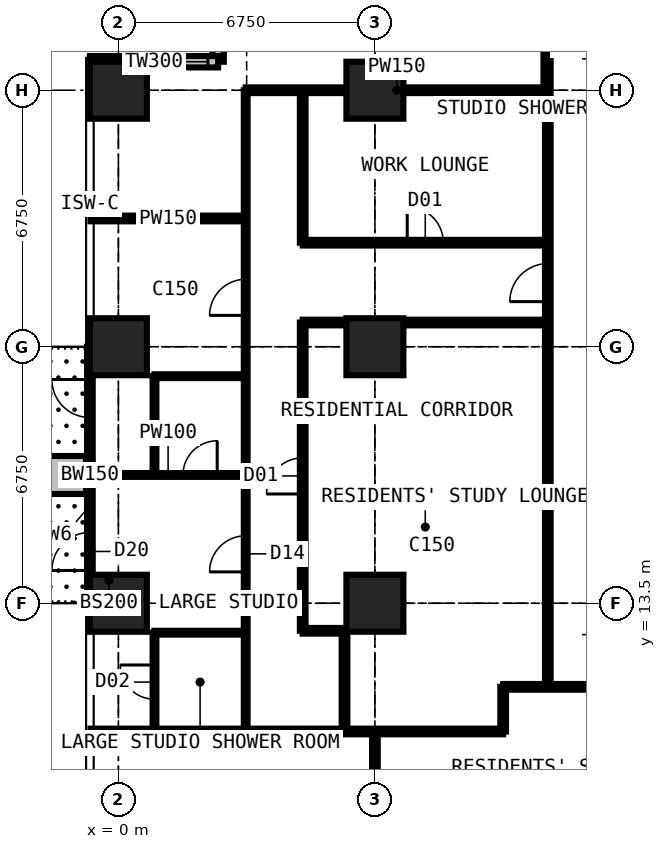
"""IFC4 building model, lengths in metres.
Left out: names, types, materials, properties, quantities, classifications, styles, units other than length and angle.
Written with IfcOpenShell. Run it as: python <this file> out.ifc"""

import sys

from ifc_helpers import new_model, si_unit, direction, frame, frame_2d, origin, origin_2d, place, context, subcontext, project, spatial, rectangle, extrude, element, fill, save


model = new_model("IFC4")
c1 = context("Model", 3, precision=1e-05, world=origin(), true_north=direction((0.0, 1.0)))
c2 = subcontext(c1, "Body", "Model", "MODEL_VIEW")
j1 = project(units=[si_unit("LENGTHUNIT", "METRE"), si_unit("PLANEANGLEUNIT", "RADIAN")], contexts=[c1])
p1 = place(None, origin())
s1 = spatial("IfcSite", under=j1, at=p1, CompositionType="ELEMENT")
p2 = place(p1, origin())
s2 = spatial("IfcBuilding", under=s1, at=p2, CompositionType="ELEMENT")
p3 = place(p2, frame((0.0, 0.0, 163.8)))
s3 = spatial("IfcBuildingStorey", under=s2, at=p3, CompositionType="ELEMENT", Elevation=163.8)
for number, where, z_axis, x_axis in (
    (1, (0.0, 13.5, 0.0), (0.0, 0.0, 1.0), (1.0, 0.0, 0.0)),
    (2, (0.0, 20.25, 0.0), (0.0, 0.0, 1.0), (1.0, 0.0, 0.0)),
    (3, (0.0, 27.0, 0.0), (0.0, 0.0, 1.0), (1.0, 0.0, 0.0)),
    (4, (6.75, 13.5, 0.0), (0.0, 0.0, 1.0), (1.0, 0.0, 0.0)),
    (5, (6.75, 20.25, 0.0), (0.0, 0.0, 1.0), (1.0, 0.0, 0.0)),
    (6, (6.75, 27.0, 0.0), (0.0, 0.0, 1.0), (1.0, 0.0, 0.0)),
):
    element("IfcColumn", number, at=place(p3, frame(where, z_axis=z_axis, x_axis=x_axis)), inside=s3, PredefinedType="COLUMN", context=c2, shape_type="SweptSolid", body=[
        extrude(rectangle(XDim=1.5, YDim=1.5, at=origin_2d()), origin(), (0.0, 0.0, 1.0), 3.6),
    ])
p4 = place(p3, frame((2.625, 31.125, 0.0), z_axis=(0.0, 0.0, 1.0), x_axis=(0.0, -1.0, 0.0)))
e7 = element("IfcWall", 7, at=p4, inside=s3, PredefinedType="SOLIDWALL", context=c2, shape_type="SweptSolid", body=[
    extrude(rectangle(XDim=3.375, YDim=0.3, at=frame_2d((1.688, 0.0))), origin(), (0.0, 0.0, 1.0), 3.375),
])
p5 = place(p4, frame((0.788, 0.0, 0.6)))
e8 = element("IfcOpeningElement", 8, at=p5, cuts=e7, PredefinedType="OPENING", context=c2, shape_type="SweptSolid", body=[
    extrude(rectangle(XDim=1.8, YDim=2.1, at=frame_2d((0.9, 1.05))), frame((0.0, 0.16, 0.0), z_axis=(0.0, -1.0, 0.0), x_axis=(1.0, 0.0, 0.0)), (0.0, 0.0, 1.0), 0.32),
])
p6 = place(p3, frame((2.625, 27.75, 0.0), z_axis=(0.0, 0.0, 1.0), x_axis=(-1.0, 0.0, 0.0)))
e9 = element("IfcWall", 9, at=p6, inside=s3, PredefinedType="SOLIDWALL", context=c2, shape_type="SweptSolid", body=[
    extrude(rectangle(XDim=3.375, YDim=0.3, at=frame_2d((1.688, 0.0))), origin(), (0.0, 0.0, 1.0), 3.375),
])
p7 = place(p6, frame((0.268, 0.0, 0.9)))
e10 = element("IfcOpeningElement", 10, at=p7, cuts=e9, PredefinedType="OPENING", context=c2, shape_type="SweptSolid", body=[
    extrude(rectangle(XDim=1.5, YDim=1.8, at=frame_2d((0.75, 0.9))), frame((0.0, 0.16, 0.0), z_axis=(0.0, -1.0, 0.0), x_axis=(1.0, 0.0, 0.0)), (0.0, 0.0, 1.0), 0.32),
])
p8 = place(p3, frame((-0.75, 13.5, 0.0), z_axis=(0.0, 0.0, 1.0), x_axis=(0.0, 1.0, 0.0)))
e11 = element("IfcWall", 11, at=p8, inside=s3, PredefinedType="SOLIDWALL", context=c2, shape_type="SweptSolid", body=[
    extrude(rectangle(XDim=6.75, YDim=0.15, at=frame_2d((3.375, 0.0))), origin(), (0.0, 0.0, 1.0), 3.375),
])
p9 = place(p8, frame((0.863, 0.0, 0.0)))
e12 = element("IfcOpeningElement", 12, at=p9, cuts=e11, PredefinedType="OPENING", context=c2, shape_type="SweptSolid", body=[
    extrude(rectangle(XDim=1.0, YDim=2.2, at=frame_2d((0.5, 1.1))), frame((0.0, 0.085, 0.0), z_axis=(0.0, -1.0, 0.0), x_axis=(1.0, 0.0, 0.0)), (0.0, 0.0, 1.0), 0.17),
])
p10 = place(p8, frame((1.975, 0.0, 0.9)))
e13 = element("IfcOpeningElement", 13, at=p10, cuts=e11, PredefinedType="OPENING", context=c2, shape_type="SweptSolid", body=[
    extrude(rectangle(XDim=1.2, YDim=1.8, at=frame_2d((0.6, 0.9))), frame((0.0, 0.085, 0.0), z_axis=(0.0, -1.0, 0.0), x_axis=(1.0, 0.0, 0.0)), (0.0, 0.0, 1.0), 0.17),
])
p11 = place(p8, frame((4.887, 0.0, 0.0)))
e14 = element("IfcOpeningElement", 14, at=p11, cuts=e11, PredefinedType="OPENING", context=c2, shape_type="SweptSolid", body=[
    extrude(rectangle(XDim=1.0, YDim=2.2, at=frame_2d((0.5, 1.1))), frame((0.0, 0.085, 0.0), z_axis=(0.0, -1.0, 0.0), x_axis=(1.0, 0.0, 0.0)), (0.0, 0.0, 1.0), 0.17),
])
p12 = place(p8, frame((3.575, 0.0, 0.9)))
e15 = element("IfcOpeningElement", 15, at=p12, cuts=e11, PredefinedType="OPENING", context=c2, shape_type="SweptSolid", body=[
    extrude(rectangle(XDim=1.2, YDim=1.8, at=frame_2d((0.6, 0.9))), frame((0.0, 0.085, 0.0), z_axis=(0.0, -1.0, 0.0), x_axis=(1.0, 0.0, 0.0)), (0.0, 0.0, 1.0), 0.17),
])
p13 = place(p3, frame((-0.85, 16.875, 0.0), z_axis=(0.0, 0.0, 1.0), x_axis=(-1.0, 0.0, 0.0)))
e16 = element("IfcWall", 16, at=p13, inside=s3, PredefinedType="USERDEFINED", context=c2, shape_type="SweptSolid", body=[
    extrude(rectangle(XDim=2.2, YDim=1.0, at=frame_2d((1.1, 0.0))), origin(), (0.0, 0.0, 1.0), 0.9),
])
p14 = place(p3, frame((-0.734, 10.125, 0.0), z_axis=(0.0, 0.0, 1.0), x_axis=(1.0, 0.0, 0.0)))
e17 = element("IfcWall", 17, at=p14, inside=s3, PredefinedType="PARTITIONING", context=c2, shape_type="SweptSolid", body=[
    extrude(rectangle(XDim=10.859, YDim=0.15, at=frame_2d((5.429, 0.0))), origin(), (0.0, 0.0, 1.0), 3.375),
])
p15 = place(p3, frame((-0.734, 16.875, 0.0), z_axis=(0.0, 0.0, 1.0), x_axis=(1.0, 0.0, 0.0)))
e18 = element("IfcWall", 18, at=p15, inside=s3, PredefinedType="PARTITIONING", context=c2, shape_type="SweptSolid", body=[
    extrude(rectangle(XDim=4.084, YDim=0.1, at=frame_2d((2.042, 0.0))), origin(), (0.0, 0.0, 1.0), 3.375),
])
p16 = place(p15, frame((2.434, 0.0, 0.0)))
e19 = element("IfcOpeningElement", 19, at=p16, cuts=e18, PredefinedType="OPENING", context=c2, shape_type="SweptSolid", body=[
    extrude(rectangle(XDim=0.9, YDim=2.2, at=frame_2d((0.45, 1.1))), frame((0.0, 0.06, 0.0), z_axis=(0.0, -1.0, 0.0), x_axis=(1.0, 0.0, 0.0)), (0.0, 0.0, 1.0), 0.12),
])
p17 = place(p3, frame((-0.734, 23.625, 0.0), z_axis=(0.0, 0.0, 1.0), x_axis=(1.0, 0.0, 0.0)))
e20 = element("IfcWall", 20, at=p17, inside=s3, PredefinedType="PARTITIONING", context=c2, shape_type="SweptSolid", body=[
    extrude(rectangle(XDim=4.084, YDim=0.15, at=frame_2d((2.042, 0.0))), origin(), (0.0, 0.0, 1.0), 3.375),
])
p18 = place(p3, frame((0.95, 10.125, 0.0), z_axis=(0.0, 0.0, 1.0), x_axis=(0.0, 1.0, 0.0)))
e21 = element("IfcWall", 21, at=p18, inside=s3, PredefinedType="PARTITIONING", context=c2, shape_type="SweptSolid", body=[
    extrude(rectangle(XDim=2.6, YDim=0.1, at=frame_2d((1.3, 0.0))), origin(), (0.0, 0.0, 1.0), 3.375),
])
p19 = place(p18, frame((0.85, 0.0, 0.0)))
e22 = element("IfcOpeningElement", 22, at=p19, cuts=e21, PredefinedType="OPENING", context=c2, shape_type="SweptSolid", body=[
    extrude(rectangle(XDim=0.9, YDim=2.2, at=frame_2d((0.45, 1.1))), frame((0.0, 0.06, 0.0), z_axis=(0.0, -1.0, 0.0), x_axis=(1.0, 0.0, 0.0)), (0.0, 0.0, 1.0), 0.12),
])
p20 = place(p3, frame((0.95, 12.725, 0.0), z_axis=(0.0, 0.0, 1.0), x_axis=(1.0, 0.0, 0.0)))
e23 = element("IfcWall", 23, at=p20, inside=s3, PredefinedType="PARTITIONING", context=c2, shape_type="SweptSolid", body=[
    extrude(rectangle(XDim=2.4, YDim=0.1, at=frame_2d((1.2, 0.0))), origin(), (0.0, 0.0, 1.0), 3.375),
])
p21 = place(p3, frame((0.95, 16.875, 0.0), z_axis=(0.0, 0.0, 1.0), x_axis=(0.0, 1.0, 0.0)))
e24 = element("IfcWall", 24, at=p21, inside=s3, PredefinedType="PARTITIONING", context=c2, shape_type="SweptSolid", body=[
    extrude(rectangle(XDim=2.6, YDim=0.1, at=frame_2d((1.3, 0.0))), origin(), (0.0, 0.0, 1.0), 3.375),
])
p22 = place(p3, frame((0.95, 19.475, 0.0), z_axis=(0.0, 0.0, 1.0), x_axis=(1.0, 0.0, 0.0)))
e25 = element("IfcWall", 25, at=p22, inside=s3, PredefinedType="PARTITIONING", context=c2, shape_type="SweptSolid", body=[
    extrude(rectangle(XDim=2.4, YDim=0.1, at=frame_2d((1.2, 0.0))), origin(), (0.0, 0.0, 1.0), 3.375),
])
p23 = place(p3, frame((3.35, 10.125, 0.0), z_axis=(0.0, 0.0, 1.0), x_axis=(0.0, 1.0, 0.0)))
e26 = element("IfcWall", 26, at=p23, inside=s3, PredefinedType="PARTITIONING", context=c2, shape_type="SweptSolid", body=[
    extrude(rectangle(XDim=16.875, YDim=0.1, at=frame_2d((8.438, 0.0))), origin(), (0.0, 0.0, 1.0), 3.375),
])
p24 = place(p23, frame((4.2, 0.0, 0.0)))
e27 = element("IfcOpeningElement", 27, at=p24, cuts=e26, PredefinedType="OPENING", context=c2, shape_type="SweptSolid", body=[
    extrude(rectangle(XDim=0.95, YDim=2.2, at=frame_2d((0.475, 1.1))), frame((0.0, 0.06, 0.0), z_axis=(0.0, -1.0, 0.0), x_axis=(1.0, 0.0, 0.0)), (0.0, 0.0, 1.0), 0.12),
])
p25 = place(p23, frame((10.95, 0.0, 0.0)))
e28 = element("IfcOpeningElement", 28, at=p25, cuts=e26, PredefinedType="OPENING", context=c2, shape_type="SweptSolid", body=[
    extrude(rectangle(XDim=0.95, YDim=2.2, at=frame_2d((0.475, 1.1))), frame((0.0, 0.06, 0.0), z_axis=(0.0, -1.0, 0.0), x_axis=(1.0, 0.0, 0.0)), (0.0, 0.0, 1.0), 0.12),
])
p26 = place(p3, frame((3.35, 27.0, 0.0), z_axis=(0.0, 0.0, 1.0), x_axis=(1.0, 0.0, 0.0)))
e29 = element("IfcWall", 29, at=p26, inside=s3, PredefinedType="PARTITIONING", context=c2, shape_type="SweptSolid", body=[
    extrude(rectangle(XDim=7.95, YDim=0.15, at=frame_2d((3.975, 0.0))), origin(), (0.0, 0.0, 1.0), 2.806),
])
p27 = place(p3, frame((4.85, 12.775, 0.0), z_axis=(0.0, 0.0, 1.0), x_axis=(0.0, 1.0, 0.0)))
e30 = element("IfcWall", 30, at=p27, inside=s3, PredefinedType="PARTITIONING", context=c2, shape_type="SweptSolid", body=[
    extrude(rectangle(XDim=8.113, YDim=0.15, at=frame_2d((4.056, 0.0))), origin(), (0.0, 0.0, 1.0), 3.375),
])
p28 = place(p27, frame((3.6, 0.0, 0.0)))
e31 = element("IfcOpeningElement", 31, at=p28, cuts=e30, PredefinedType="OPENING", context=c2, shape_type="SweptSolid", body=[
    extrude(rectangle(XDim=0.95, YDim=2.2, at=frame_2d((0.475, 1.1))), frame((0.0, 0.085, 0.0), z_axis=(0.0, -1.0, 0.0), x_axis=(1.0, 0.0, 0.0)), (0.0, 0.0, 1.0), 0.17),
])
p29 = place(p3, frame((4.85, 12.775, 0.0), z_axis=(0.0, 0.0, 1.0), x_axis=(1.0, 0.0, 0.0)))
e32 = element("IfcWall", 32, at=p29, inside=s3, PredefinedType="PARTITIONING", context=c2, shape_type="SweptSolid", body=[
    extrude(rectangle(XDim=1.1, YDim=0.15, at=frame_2d((0.55, 0.0))), origin(), (0.0, 0.0, 1.0), 3.375),
])
p30 = place(p3, frame((4.85, 20.887, 0.0), z_axis=(0.0, 0.0, 1.0), x_axis=(1.0, 0.0, 0.0)))
e33 = element("IfcWall", 33, at=p30, inside=s3, PredefinedType="PARTITIONING", context=c2, shape_type="SweptSolid", body=[
    extrude(rectangle(XDim=6.45, YDim=0.15, at=frame_2d((3.225, 0.0))), origin(), (0.0, 0.0, 1.0), 3.375),
])
p31 = place(p3, frame((4.85, 22.988, 0.0), z_axis=(0.0, 0.0, 1.0), x_axis=(0.0, 1.0, 0.0)))
e34 = element("IfcWall", 34, at=p31, inside=s3, PredefinedType="PARTITIONING", context=c2, shape_type="SweptSolid", body=[
    extrude(rectangle(XDim=4.012, YDim=0.15, at=frame_2d((2.006, 0.0))), origin(), (0.0, 0.0, 1.0), 3.375),
])
p32 = place(p3, frame((4.85, 22.988, 0.0), z_axis=(0.0, 0.0, 1.0), x_axis=(1.0, 0.0, 0.0)))
e35 = element("IfcWall", 35, at=p32, inside=s3, PredefinedType="PARTITIONING", context=c2, shape_type="SweptSolid", body=[
    extrude(rectangle(XDim=6.45, YDim=0.15, at=frame_2d((3.225, 0.0))), origin(), (0.0, 0.0, 1.0), 3.375),
])
p33 = place(p32, frame((2.75, 0.0, 0.0)))
e36 = element("IfcOpeningElement", 36, at=p33, cuts=e35, PredefinedType="OPENING", context=c2, shape_type="SweptSolid", body=[
    extrude(rectangle(XDim=0.95, YDim=2.2, at=frame_2d((0.475, 1.1))), frame((0.0, 0.085, 0.0), z_axis=(0.0, -1.0, 0.0), x_axis=(1.0, 0.0, 0.0)), (0.0, 0.0, 1.0), 0.17),
])
p34 = place(p3, frame((5.95, 10.125, 0.0), z_axis=(0.0, 0.0, 1.0), x_axis=(0.0, 1.0, 0.0)))
e37 = element("IfcWall", 37, at=p34, inside=s3, PredefinedType="PARTITIONING", context=c2, shape_type="SweptSolid", body=[
    extrude(rectangle(XDim=2.65, YDim=0.15, at=frame_2d((1.325, 0.0))), origin(), (0.0, 0.0, 1.0), 3.375),
])
p35 = place(p3, frame((6.75, 3.35, 0.0), z_axis=(0.0, 0.0, 1.0), x_axis=(0.0, 1.0, 0.0)))
e38 = element("IfcWall", 38, at=p35, inside=s3, PredefinedType="PARTITIONING", context=c2, shape_type="SweptSolid", body=[
    extrude(rectangle(XDim=6.775, YDim=0.15, at=frame_2d((3.387, 0.0))), origin(), (0.0, 0.0, 1.0), 2.877),
])
p36 = place(p3, frame((10.125, 10.125, 0.0), z_axis=(0.0, 0.0, 1.0), x_axis=(0.0, 1.0, 0.0)))
e39 = element("IfcWall", 39, at=p36, inside=s3, PredefinedType="PARTITIONING", context=c2, shape_type="SweptSolid", body=[
    extrude(rectangle(XDim=1.175, YDim=0.15, at=frame_2d((0.587, 0.0))), origin(), (0.0, 0.0, 1.0), 3.375),
])
p37 = place(p3, frame((10.125, 11.3, 0.0), z_axis=(0.0, 0.0, 1.0), x_axis=(1.0, 0.0, 0.0)))
e40 = element("IfcWall", 40, at=p37, inside=s3, PredefinedType="PARTITIONING", context=c2, shape_type="SweptSolid", body=[
    extrude(rectangle(XDim=20.475, YDim=0.15, at=frame_2d((10.238, 0.0))), origin(), (0.0, 0.0, 1.0), 3.375),
])
p38 = place(p37, frame((8.425, 0.0, 0.0)))
e41 = element("IfcOpeningElement", 41, at=p38, cuts=e40, PredefinedType="OPENING", context=c2, shape_type="SweptSolid", body=[
    extrude(rectangle(XDim=1.0, YDim=2.2, at=frame_2d((0.5, 1.1))), frame((0.0, 0.085, 0.0), z_axis=(0.0, -1.0, 0.0), x_axis=(1.0, 0.0, 0.0)), (0.0, 0.0, 1.0), 0.17),
])
p39 = place(p37, frame((10.975, 0.0, 0.0)))
e42 = element("IfcOpeningElement", 42, at=p39, cuts=e40, PredefinedType="OPENING", context=c2, shape_type="SweptSolid", body=[
    extrude(rectangle(XDim=1.0, YDim=2.2, at=frame_2d((0.5, 1.1))), frame((0.0, 0.085, 0.0), z_axis=(0.0, -1.0, 0.0), x_axis=(1.0, 0.0, 0.0)), (0.0, 0.0, 1.0), 0.17),
])
p40 = place(p37, frame((3.925, 0.0, 0.0)))
e43 = element("IfcOpeningElement", 43, at=p40, cuts=e40, PredefinedType="OPENING", context=c2, shape_type="SweptSolid", body=[
    extrude(rectangle(XDim=0.95, YDim=2.2, at=frame_2d((0.475, 1.1))), frame((0.0, 0.085, 0.0), z_axis=(0.0, -1.0, 0.0), x_axis=(1.0, 0.0, 0.0)), (0.0, 0.0, 1.0), 0.17),
])
p41 = place(p3, frame((11.3, 11.3, 0.0), z_axis=(0.0, 0.0, 1.0), x_axis=(0.0, 1.0, 0.0)))
e44 = element("IfcWall", 44, at=p41, inside=s3, PredefinedType="PARTITIONING", context=c2, shape_type="SweptSolid", body=[
    extrude(rectangle(XDim=19.3, YDim=0.15, at=frame_2d((9.65, 0.0))), origin(), (0.0, 0.0, 1.0), 3.375),
])
p42 = place(p41, frame((18.1, 0.0, 0.0)))
e45 = element("IfcOpeningElement", 45, at=p42, cuts=e44, PredefinedType="OPENING", context=c2, shape_type="SweptSolid", body=[
    extrude(rectangle(XDim=1.0, YDim=2.2, at=frame_2d((0.5, 1.1))), frame((0.0, 0.085, 0.0), z_axis=(0.0, -1.0, 0.0), x_axis=(1.0, 0.0, 0.0)), (0.0, 0.0, 1.0), 0.17),
])
p43 = place(p41, frame((10.137, 0.0, 0.0)))
e46 = element("IfcOpeningElement", 46, at=p43, cuts=e44, PredefinedType="OPENING", context=c2, shape_type="SweptSolid", body=[
    extrude(rectangle(XDim=1.0, YDim=2.2, at=frame_2d((0.5, 1.1))), frame((0.0, 0.085, 0.0), z_axis=(0.0, -1.0, 0.0), x_axis=(1.0, 0.0, 0.0)), (0.0, 0.0, 1.0), 0.17),
])
p44 = place(p7, origin())
e47 = element("IfcWindow", 47, at=p44, inside=s3, PartitioningType="SINGLE_PANEL", PredefinedType="WINDOW", context=c2, shape_type="SweptSolid", body=[
    extrude(rectangle(XDim=1.5, YDim=1.8, at=frame_2d((0.75, 0.9))), frame((0.0, 0.03, 0.0), z_axis=(0.0, -1.0, 0.0), x_axis=(1.0, 0.0, 0.0)), (0.0, 0.0, 1.0), 0.06),
])
fill(e10, e47)
p45 = place(p9, origin())
e48 = element("IfcDoor", 48, at=p45, inside=s3, OperationType="SINGLE_SWING_LEFT", PredefinedType="DOOR", context=c2, shape_type="SweptSolid", body=[
    extrude(rectangle(XDim=1.0, YDim=2.2, at=frame_2d((0.5, 1.1))), frame((0.0, 0.025, 0.0), z_axis=(0.0, -1.0, 0.0), x_axis=(1.0, 0.0, 0.0)), (0.0, 0.0, 1.0), 0.05),
])
fill(e12, e48)
p46 = place(p10, origin())
e49 = element("IfcWindow", 49, at=p46, inside=s3, PartitioningType="SINGLE_PANEL", PredefinedType="WINDOW", context=c2, shape_type="SweptSolid", body=[
    extrude(rectangle(XDim=1.2, YDim=1.8, at=frame_2d((0.6, 0.9))), frame((0.0, 0.03, 0.0), z_axis=(0.0, -1.0, 0.0), x_axis=(1.0, 0.0, 0.0)), (0.0, 0.0, 1.0), 0.06),
])
fill(e13, e49)
p47 = place(p11, origin())
e50 = element("IfcDoor", 50, at=p47, inside=s3, OperationType="SINGLE_SWING_RIGHT", PredefinedType="DOOR", context=c2, shape_type="SweptSolid", body=[
    extrude(rectangle(XDim=1.0, YDim=2.2, at=frame_2d((0.5, 1.1))), frame((0.0, 0.025, 0.0), z_axis=(0.0, -1.0, 0.0), x_axis=(1.0, 0.0, 0.0)), (0.0, 0.0, 1.0), 0.05),
])
fill(e14, e50)
p48 = place(p12, origin())
e51 = element("IfcWindow", 51, at=p48, inside=s3, PartitioningType="SINGLE_PANEL", PredefinedType="WINDOW", context=c2, shape_type="SweptSolid", body=[
    extrude(rectangle(XDim=1.2, YDim=1.8, at=frame_2d((0.6, 0.9))), frame((0.0, 0.03, 0.0), z_axis=(0.0, -1.0, 0.0), x_axis=(1.0, 0.0, 0.0)), (0.0, 0.0, 1.0), 0.06),
])
fill(e15, e51)
p49 = place(p24, origin())
e52 = element("IfcDoor", 52, at=p49, inside=s3, OperationType="SINGLE_SWING_LEFT", PredefinedType="DOOR", context=c2, shape_type="SweptSolid", body=[
    extrude(rectangle(XDim=0.95, YDim=2.2, at=frame_2d((0.475, 1.1))), frame((0.0, 0.025, 0.0), z_axis=(0.0, -1.0, 0.0), x_axis=(1.0, 0.0, 0.0)), (0.0, 0.0, 1.0), 0.05),
])
fill(e27, e52)
p50 = place(p19, origin())
e53 = element("IfcDoor", 53, at=p50, inside=s3, OperationType="SINGLE_SWING_RIGHT", PredefinedType="DOOR", context=c2, shape_type="SweptSolid", body=[
    extrude(rectangle(XDim=0.9, YDim=2.2, at=frame_2d((0.45, 1.1))), frame((0.0, 0.025, 0.0), z_axis=(0.0, -1.0, 0.0), x_axis=(1.0, 0.0, 0.0)), (0.0, 0.0, 1.0), 0.05),
])
fill(e22, e53)
p51 = place(p25, origin())
e54 = element("IfcDoor", 54, at=p51, inside=s3, OperationType="SINGLE_SWING_LEFT", PredefinedType="DOOR", context=c2, shape_type="SweptSolid", body=[
    extrude(rectangle(XDim=0.95, YDim=2.2, at=frame_2d((0.475, 1.1))), frame((0.0, 0.025, 0.0), z_axis=(0.0, -1.0, 0.0), x_axis=(1.0, 0.0, 0.0)), (0.0, 0.0, 1.0), 0.05),
])
fill(e28, e54)
p52 = place(p16, origin())
e55 = element("IfcDoor", 55, at=p52, inside=s3, OperationType="SINGLE_SWING_RIGHT", PredefinedType="DOOR", context=c2, shape_type="SweptSolid", body=[
    extrude(rectangle(XDim=0.9, YDim=2.2, at=frame_2d((0.45, 1.1))), frame((0.0, 0.025, 0.0), z_axis=(0.0, -1.0, 0.0), x_axis=(1.0, 0.0, 0.0)), (0.0, 0.0, 1.0), 0.05),
])
fill(e19, e55)
p53 = place(p43, origin())
e56 = element("IfcDoor", 56, at=p53, inside=s3, OperationType="SINGLE_SWING_LEFT", PredefinedType="DOOR", context=c2, shape_type="SweptSolid", body=[
    extrude(rectangle(XDim=1.0, YDim=2.2, at=frame_2d((0.5, 1.1))), frame((0.0, 0.025, 0.0), z_axis=(0.0, -1.0, 0.0), x_axis=(1.0, 0.0, 0.0)), (0.0, 0.0, 1.0), 0.05),
])
fill(e46, e56)
p54 = place(p28, origin())
e57 = element("IfcDoor", 57, at=p54, inside=s3, OperationType="SINGLE_SWING_LEFT", PredefinedType="DOOR", context=c2, shape_type="SweptSolid", body=[
    extrude(rectangle(XDim=0.95, YDim=2.2, at=frame_2d((0.475, 1.1))), frame((0.0, 0.025, 0.0), z_axis=(0.0, -1.0, 0.0), x_axis=(1.0, 0.0, 0.0)), (0.0, 0.0, 1.0), 0.05),
])
fill(e31, e57)
p55 = place(p33, origin())
e58 = element("IfcDoor", 58, at=p55, inside=s3, OperationType="SINGLE_SWING_LEFT", PredefinedType="DOOR", context=c2, shape_type="SweptSolid", body=[
    extrude(rectangle(XDim=0.95, YDim=2.2, at=frame_2d((0.475, 1.1))), frame((0.0, 0.025, 0.0), z_axis=(0.0, -1.0, 0.0), x_axis=(1.0, 0.0, 0.0)), (0.0, 0.0, 1.0), 0.05),
])
fill(e36, e58)
save(model, sys.argv[1])
